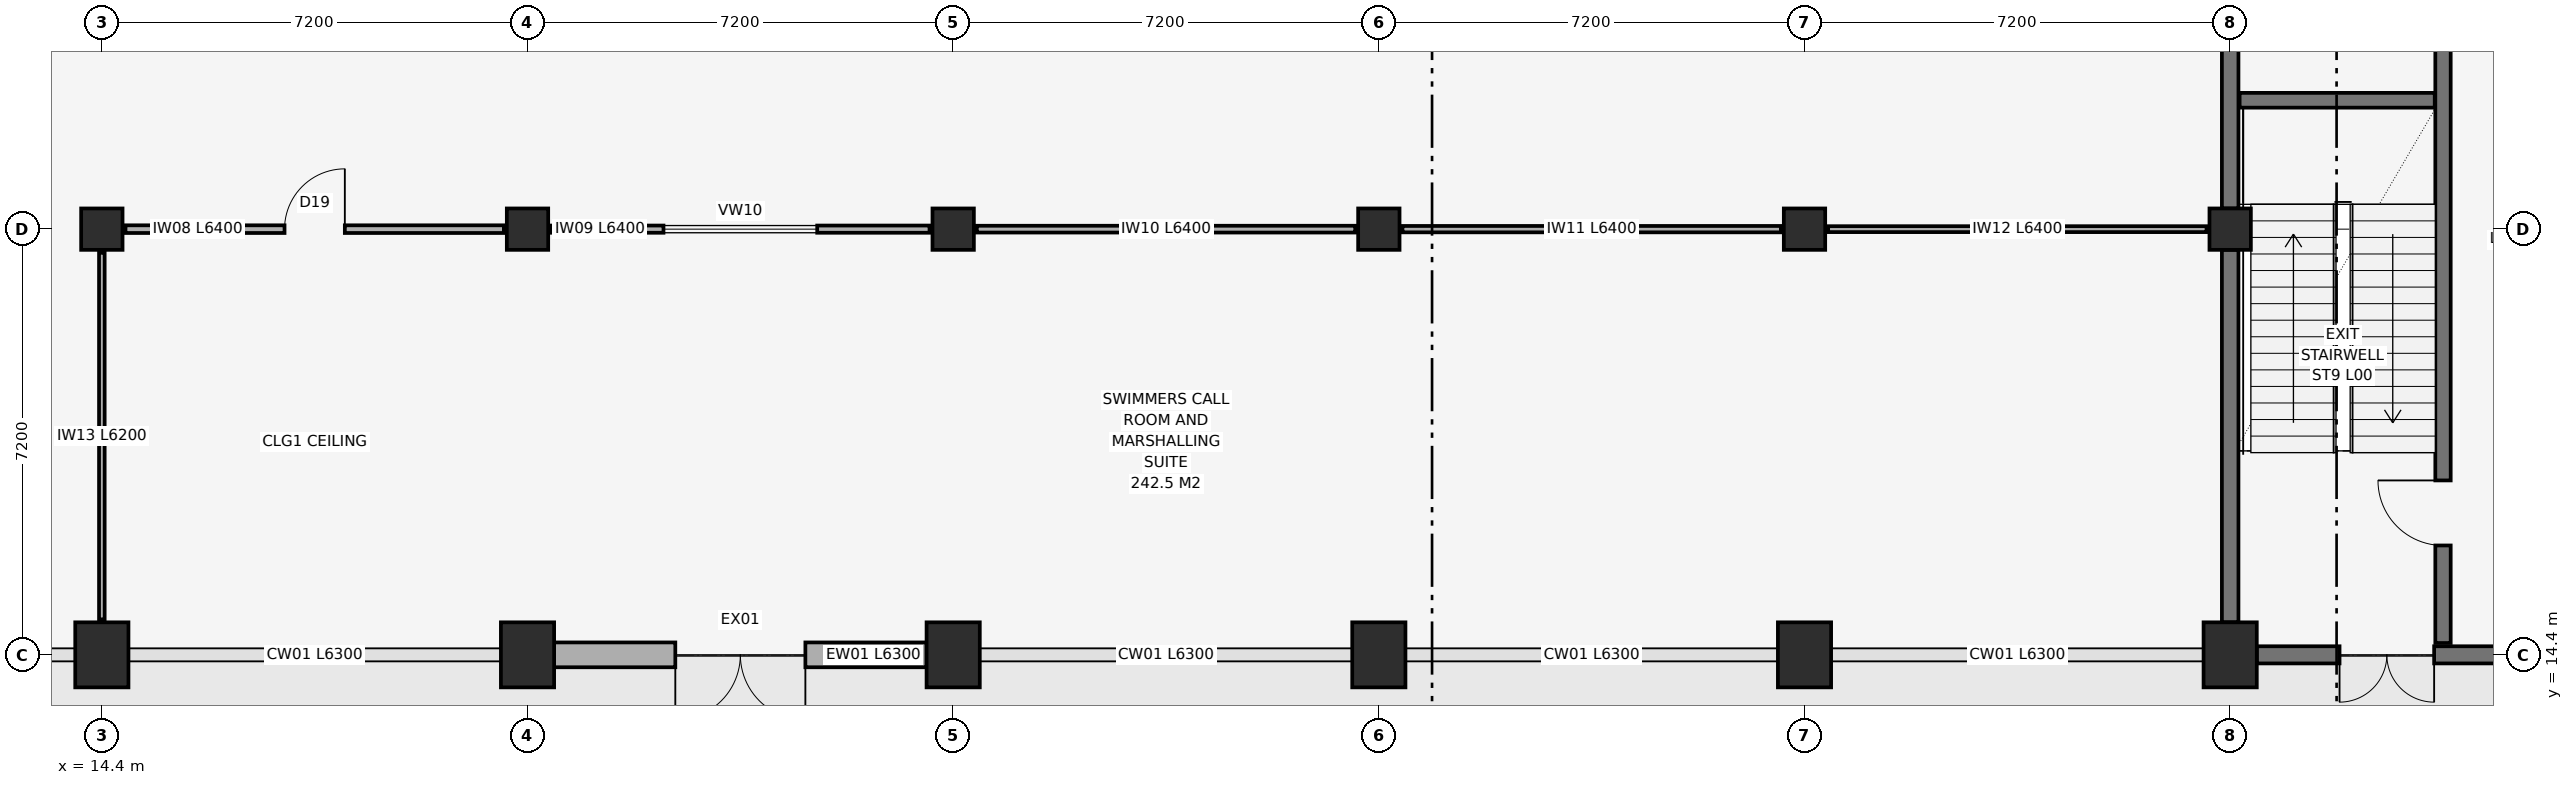
"""IFC4 building model, lengths in metres.
Left out: names, types, materials, properties, quantities, classifications, styles, units other than length and angle.
Written with IfcOpenShell. Run it as: python <this file> out.ifc"""

import sys

from ifc_helpers import new_model, si_unit, direction, frame, frame_2d, origin, origin_2d, place, context, subcontext, project, spatial, rectangle, extrude, element, fill, save


model = new_model("IFC4")
c1 = context("Model", 3, precision=1e-05, world=origin(), true_north=direction((0.0, 1.0)))
c2 = subcontext(c1, "Body", "Model", "MODEL_VIEW")
j1 = project(units=[si_unit("LENGTHUNIT", "METRE"), si_unit("PLANEANGLEUNIT", "RADIAN")], contexts=[c1])
p1 = place(None, origin())
s1 = spatial("IfcSite", under=j1, at=p1, CompositionType="ELEMENT")
p2 = place(p1, origin())
s2 = spatial("IfcBuilding", under=s1, at=p2, CompositionType="ELEMENT")
p3 = place(p2, origin())
s3 = spatial("IfcBuildingStorey", under=s2, at=p3, CompositionType="ELEMENT", Elevation=0.0)
p4 = place(p3, frame((14.4, 14.4, 0.0), z_axis=(0.0, 0.0, 1.0), x_axis=(1.0, 0.0, 0.0)))
e1 = element("IfcColumn", 1, at=p4, inside=s3, PredefinedType="COLUMN", context=c2, shape_type="SweptSolid", body=[
    extrude(rectangle(XDim=0.9, YDim=1.1, at=origin_2d()), origin(), (0.0, 0.0, 1.0), 5.4),
])
p5 = place(p3, frame((14.4, 21.6, 0.0), z_axis=(0.0, 0.0, 1.0), x_axis=(1.0, 0.0, 0.0)))
e2 = element("IfcColumn", 2, at=p5, inside=s3, PredefinedType="COLUMN", context=c2, shape_type="SweptSolid", body=[
    extrude(rectangle(XDim=0.7, YDim=0.7, at=origin_2d()), origin(), (0.0, 0.0, 1.0), 5.4),
])
p6 = place(p3, frame((21.6, 14.4, 0.0), z_axis=(0.0, 0.0, 1.0), x_axis=(1.0, 0.0, 0.0)))
e3 = element("IfcColumn", 3, at=p6, inside=s3, PredefinedType="COLUMN", context=c2, shape_type="SweptSolid", body=[
    extrude(rectangle(XDim=0.9, YDim=1.1, at=origin_2d()), origin(), (0.0, 0.0, 1.0), 5.4),
])
p7 = place(p3, frame((21.6, 21.6, 0.0), z_axis=(0.0, 0.0, 1.0), x_axis=(1.0, 0.0, 0.0)))
e4 = element("IfcColumn", 4, at=p7, inside=s3, PredefinedType="COLUMN", context=c2, shape_type="SweptSolid", body=[
    extrude(rectangle(XDim=0.7, YDim=0.7, at=origin_2d()), origin(), (0.0, 0.0, 1.0), 5.4),
])
p8 = place(p3, frame((28.8, 14.4, 0.0), z_axis=(0.0, 0.0, 1.0), x_axis=(1.0, 0.0, 0.0)))
e5 = element("IfcColumn", 5, at=p8, inside=s3, PredefinedType="COLUMN", context=c2, shape_type="SweptSolid", body=[
    extrude(rectangle(XDim=0.9, YDim=1.1, at=origin_2d()), origin(), (0.0, 0.0, 1.0), 5.4),
])
p9 = place(p3, frame((28.8, 21.6, 0.0), z_axis=(0.0, 0.0, 1.0), x_axis=(1.0, 0.0, 0.0)))
e6 = element("IfcColumn", 6, at=p9, inside=s3, PredefinedType="COLUMN", context=c2, shape_type="SweptSolid", body=[
    extrude(rectangle(XDim=0.7, YDim=0.7, at=origin_2d()), origin(), (0.0, 0.0, 1.0), 5.4),
])
p10 = place(p3, frame((36.0, 14.4, 0.0), z_axis=(0.0, 0.0, 1.0), x_axis=(1.0, 0.0, 0.0)))
e7 = element("IfcColumn", 7, at=p10, inside=s3, PredefinedType="COLUMN", context=c2, shape_type="SweptSolid", body=[
    extrude(rectangle(XDim=0.9, YDim=1.1, at=origin_2d()), origin(), (0.0, 0.0, 1.0), 5.4),
])
p11 = place(p3, frame((36.0, 21.6, 0.0), z_axis=(0.0, 0.0, 1.0), x_axis=(1.0, 0.0, 0.0)))
e8 = element("IfcColumn", 8, at=p11, inside=s3, PredefinedType="COLUMN", context=c2, shape_type="SweptSolid", body=[
    extrude(rectangle(XDim=0.7, YDim=0.7, at=origin_2d()), origin(), (0.0, 0.0, 1.0), 5.4),
])
p12 = place(p3, frame((43.2, 14.4, 0.0), z_axis=(0.0, 0.0, 1.0), x_axis=(1.0, 0.0, 0.0)))
e9 = element("IfcColumn", 9, at=p12, inside=s3, PredefinedType="COLUMN", context=c2, shape_type="SweptSolid", body=[
    extrude(rectangle(XDim=0.9, YDim=1.1, at=origin_2d()), origin(), (0.0, 0.0, 1.0), 5.4),
])
p13 = place(p3, frame((43.2, 21.6, 0.0), z_axis=(0.0, 0.0, 1.0), x_axis=(1.0, 0.0, 0.0)))
e10 = element("IfcColumn", 10, at=p13, inside=s3, PredefinedType="COLUMN", context=c2, shape_type="SweptSolid", body=[
    extrude(rectangle(XDim=0.7, YDim=0.7, at=origin_2d()), origin(), (0.0, 0.0, 1.0), 5.4),
])
p14 = place(p3, frame((50.4, 14.4, 0.0), z_axis=(0.0, 0.0, 1.0), x_axis=(1.0, 0.0, 0.0)))
e11 = element("IfcColumn", 11, at=p14, inside=s3, PredefinedType="COLUMN", context=c2, shape_type="SweptSolid", body=[
    extrude(rectangle(XDim=0.9, YDim=1.1, at=origin_2d()), origin(), (0.0, 0.0, 1.0), 5.4),
])
p15 = place(p3, frame((50.4, 21.6, 0.0), z_axis=(0.0, 0.0, 1.0), x_axis=(1.0, 0.0, 0.0)))
e12 = element("IfcColumn", 12, at=p15, inside=s3, PredefinedType="COLUMN", context=c2, shape_type="SweptSolid", body=[
    extrude(rectangle(XDim=0.7, YDim=0.7, at=origin_2d()), origin(), (0.0, 0.0, 1.0), 5.4),
])
p16 = place(p3, frame((22.05, 14.4, 0.0), z_axis=(0.0, 0.0, 1.0), x_axis=(1.0, 0.0, 0.0)))
e13 = element("IfcWall", 13, at=p16, inside=s3, PredefinedType="SOLIDWALL", context=c2, shape_type="SweptSolid", body=[
    extrude(rectangle(XDim=6.3, YDim=0.42, at=frame_2d((3.15, 0.0))), origin(), (0.0, 0.0, 1.0), 4.64),
])
p17 = place(p16, frame((2.05, 0.0, 0.0)))
e14 = element("IfcOpeningElement", 14, at=p17, cuts=e13, PredefinedType="OPENING", context=c2, shape_type="SweptSolid", body=[
    extrude(rectangle(XDim=2.2, YDim=2.4, at=frame_2d((1.1, 1.2))), frame((0.0, 0.225, 0.0), z_axis=(0.0, -1.0, 0.0), x_axis=(1.0, 0.0, 0.0)), (0.0, 0.0, 1.0), 0.45),
])
p18 = place(p3, frame((50.85, 14.4, 0.0), z_axis=(0.0, 0.0, 1.0), x_axis=(1.0, 0.0, 0.0)))
e15 = element("IfcWall", 15, at=p18, inside=s3, PredefinedType="SHEAR", context=c2, shape_type="SweptSolid", body=[
    extrude(rectangle(XDim=6.3, YDim=0.29, at=frame_2d((3.15, 0.0))), origin(), (0.0, 0.0, 1.0), 5.14),
])
p19 = place(p18, frame((1.4, 0.0, 0.0)))
e16 = element("IfcOpeningElement", 16, at=p19, cuts=e15, PredefinedType="OPENING", context=c2, shape_type="SweptSolid", body=[
    extrude(rectangle(XDim=1.6, YDim=2.3, at=frame_2d((0.8, 1.15))), frame((0.0, 0.16, 0.0), z_axis=(0.0, -1.0, 0.0), x_axis=(1.0, 0.0, 0.0)), (0.0, 0.0, 1.0), 0.32),
])
p20 = place(p3, frame((50.4, 14.95, 0.0), z_axis=(0.0, 0.0, 1.0), x_axis=(0.0, 1.0, 0.0)))
e17 = element("IfcWall", 17, at=p20, inside=s3, PredefinedType="SHEAR", context=c2, shape_type="SweptSolid", body=[
    extrude(rectangle(XDim=6.3, YDim=0.28, at=frame_2d((3.15, 0.0))), origin(), (0.0, 0.0, 1.0), 5.14),
])
p21 = place(p3, frame((50.4, 21.95, 0.0), z_axis=(0.0, 0.0, 1.0), x_axis=(0.0, 1.0, 0.0)))
e18 = element("IfcWall", 18, at=p21, inside=s3, PredefinedType="SHEAR", context=c2, shape_type="SweptSolid", body=[
    extrude(rectangle(XDim=6.5, YDim=0.28, at=frame_2d((3.25, 0.0))), origin(), (0.0, 0.0, 1.0), 5.14),
])
p22 = place(p3, frame((54.0, 14.6, 0.0), z_axis=(0.0, 0.0, 1.0), x_axis=(0.0, 1.0, 0.0)))
e19 = element("IfcWall", 19, at=p22, inside=s3, PredefinedType="SHEAR", context=c2, shape_type="SweptSolid", body=[
    extrude(rectangle(XDim=14.0, YDim=0.26, at=frame_2d((7.0, 0.0))), origin(), (0.0, 0.0, 1.0), 5.14),
])
p23 = place(p22, frame((1.65, 0.0, 0.0)))
e20 = element("IfcOpeningElement", 20, at=p23, cuts=e19, PredefinedType="OPENING", context=c2, shape_type="SweptSolid", body=[
    extrude(rectangle(XDim=1.1, YDim=2.15, at=frame_2d((0.55, 1.075))), frame((0.0, 0.145, 0.0), z_axis=(0.0, -1.0, 0.0), x_axis=(1.0, 0.0, 0.0)), (0.0, 0.0, 1.0), 0.29),
])
p24 = place(p3, frame((50.56, 23.78, 0.0), z_axis=(0.0, 0.0, 1.0), x_axis=(1.0, 0.0, 0.0)))
e21 = element("IfcWall", 21, at=p24, inside=s3, PredefinedType="SHEAR", context=c2, shape_type="SweptSolid", body=[
    extrude(rectangle(XDim=3.3, YDim=0.25, at=frame_2d((1.65, 0.0))), origin(), (0.0, 0.0, 1.0), 5.14),
])
p25 = place(p3, frame((14.8, 21.6, 0.0), z_axis=(0.0, 0.0, 1.0), x_axis=(1.0, 0.0, 0.0)))
e22 = element("IfcWall", 22, at=p25, inside=s3, PredefinedType="PARTITIONING", context=c2, shape_type="SweptSolid", body=[
    extrude(rectangle(XDim=6.4, YDim=0.13, at=frame_2d((3.2, 0.0))), origin(), (0.0, 0.0, 1.0), 4.29),
])
p26 = place(p25, frame((2.69, 0.0, 0.0)))
e23 = element("IfcOpeningElement", 23, at=p26, cuts=e22, PredefinedType="OPENING", context=c2, shape_type="SweptSolid", body=[
    extrude(rectangle(XDim=1.02, YDim=2.15, at=frame_2d((0.51, 1.075))), frame((0.0, 0.08, 0.0), z_axis=(0.0, -1.0, 0.0), x_axis=(1.0, 0.0, 0.0)), (0.0, 0.0, 1.0), 0.16),
])
p27 = place(p3, frame((22.0, 21.6, 0.0), z_axis=(0.0, 0.0, 1.0), x_axis=(1.0, 0.0, 0.0)))
e24 = element("IfcWall", 24, at=p27, inside=s3, PredefinedType="PARTITIONING", context=c2, shape_type="SweptSolid", body=[
    extrude(rectangle(XDim=6.4, YDim=0.122, at=frame_2d((3.2, 0.0))), origin(), (0.0, 0.0, 1.0), 4.29),
])
p28 = place(p27, frame((1.9, 0.0, 0.95)))
e25 = element("IfcOpeningElement", 25, at=p28, cuts=e24, PredefinedType="OPENING", context=c2, shape_type="SweptSolid", body=[
    extrude(rectangle(XDim=2.6, YDim=1.2, at=frame_2d((1.3, 0.6))), frame((0.0, 0.076, 0.0), z_axis=(0.0, -1.0, 0.0), x_axis=(1.0, 0.0, 0.0)), (0.0, 0.0, 1.0), 0.152),
])
p29 = place(p3, frame((29.2, 21.6, 0.0), z_axis=(0.0, 0.0, 1.0), x_axis=(1.0, 0.0, 0.0)))
e26 = element("IfcWall", 26, at=p29, inside=s3, PredefinedType="PARTITIONING", context=c2, shape_type="SweptSolid", body=[
    extrude(rectangle(XDim=6.4, YDim=0.115, at=frame_2d((3.2, 0.0))), origin(), (0.0, 0.0, 1.0), 4.29),
])
p30 = place(p3, frame((36.4, 21.6, 0.0), z_axis=(0.0, 0.0, 1.0), x_axis=(1.0, 0.0, 0.0)))
e27 = element("IfcWall", 27, at=p30, inside=s3, PredefinedType="PARTITIONING", context=c2, shape_type="SweptSolid", body=[
    extrude(rectangle(XDim=6.4, YDim=0.108, at=frame_2d((3.2, 0.0))), origin(), (0.0, 0.0, 1.0), 4.29),
])
p31 = place(p3, frame((43.6, 21.6, 0.0), z_axis=(0.0, 0.0, 1.0), x_axis=(1.0, 0.0, 0.0)))
e28 = element("IfcWall", 28, at=p31, inside=s3, PredefinedType="PARTITIONING", context=c2, shape_type="SweptSolid", body=[
    extrude(rectangle(XDim=6.4, YDim=0.1, at=frame_2d((3.2, 0.0))), origin(), (0.0, 0.0, 1.0), 4.29),
])
p32 = place(p3, frame((14.4, 15.0, 0.0), z_axis=(0.0, 0.0, 1.0), x_axis=(0.0, 1.0, 0.0)))
e29 = element("IfcWall", 29, at=p32, inside=s3, PredefinedType="PARTITIONING", context=c2, shape_type="SweptSolid", body=[
    extrude(rectangle(XDim=6.2, YDim=0.095, at=frame_2d((3.1, 0.0))), origin(), (0.0, 0.0, 1.0), 4.49),
])
p33 = place(p17, frame((2.2, 0.0, 0.0), z_axis=(0.0, 0.0, 1.0), x_axis=(-1.0, 0.0, 0.0)))
e30 = element("IfcDoor", 30, at=p33, inside=s3, OperationType="DOUBLE_SWING_LEFT", PredefinedType="DOOR", context=c2, shape_type="SweptSolid", body=[
    extrude(rectangle(XDim=2.2, YDim=2.4, at=frame_2d((1.1, 1.2))), frame((0.0, 0.025, 0.0), z_axis=(0.0, -1.0, 0.0), x_axis=(1.0, 0.0, 0.0)), (0.0, 0.0, 1.0), 0.05),
])
fill(e14, e30)
p34 = place(p23, origin())
e31 = element("IfcDoor", 31, at=p34, inside=s3, OperationType="SINGLE_SWING_RIGHT", PredefinedType="DOOR", context=c2, shape_type="SweptSolid", body=[
    extrude(rectangle(XDim=1.1, YDim=2.15, at=frame_2d((0.55, 1.075))), frame((0.0, 0.025, 0.0), z_axis=(0.0, -1.0, 0.0), x_axis=(1.0, 0.0, 0.0)), (0.0, 0.0, 1.0), 0.05),
])
fill(e20, e31)
p35 = place(p19, frame((1.6, 0.0, 0.0), z_axis=(0.0, 0.0, 1.0), x_axis=(-1.0, 0.0, 0.0)))
e32 = element("IfcDoor", 32, at=p35, inside=s3, OperationType="DOUBLE_SWING_LEFT", PredefinedType="DOOR", context=c2, shape_type="SweptSolid", body=[
    extrude(rectangle(XDim=1.6, YDim=2.3, at=frame_2d((0.8, 1.15))), frame((0.0, 0.025, 0.0), z_axis=(0.0, -1.0, 0.0), x_axis=(1.0, 0.0, 0.0)), (0.0, 0.0, 1.0), 0.05),
])
fill(e16, e32)
p36 = place(p26, frame((1.02, 0.0, 0.0), z_axis=(0.0, 0.0, 1.0), x_axis=(-1.0, 0.0, 0.0)))
e33 = element("IfcDoor", 33, at=p36, inside=s3, OperationType="SINGLE_SWING_LEFT", PredefinedType="DOOR", context=c2, shape_type="SweptSolid", body=[
    extrude(rectangle(XDim=1.02, YDim=2.15, at=frame_2d((0.51, 1.075))), frame((0.0, 0.025, 0.0), z_axis=(0.0, -1.0, 0.0), x_axis=(1.0, 0.0, 0.0)), (0.0, 0.0, 1.0), 0.05),
])
fill(e23, e33)
p37 = place(p28, origin())
e34 = element("IfcWindow", 34, at=p37, inside=s3, PartitioningType="SINGLE_PANEL", PredefinedType="WINDOW", context=c2, shape_type="SweptSolid", body=[
    extrude(rectangle(XDim=2.6, YDim=1.2, at=frame_2d((1.3, 0.6))), frame((0.0, 0.03, 0.0), z_axis=(0.0, -1.0, 0.0), x_axis=(1.0, 0.0, 0.0)), (0.0, 0.0, 1.0), 0.06),
])
fill(e25, e34)
save(model, sys.argv[1])
